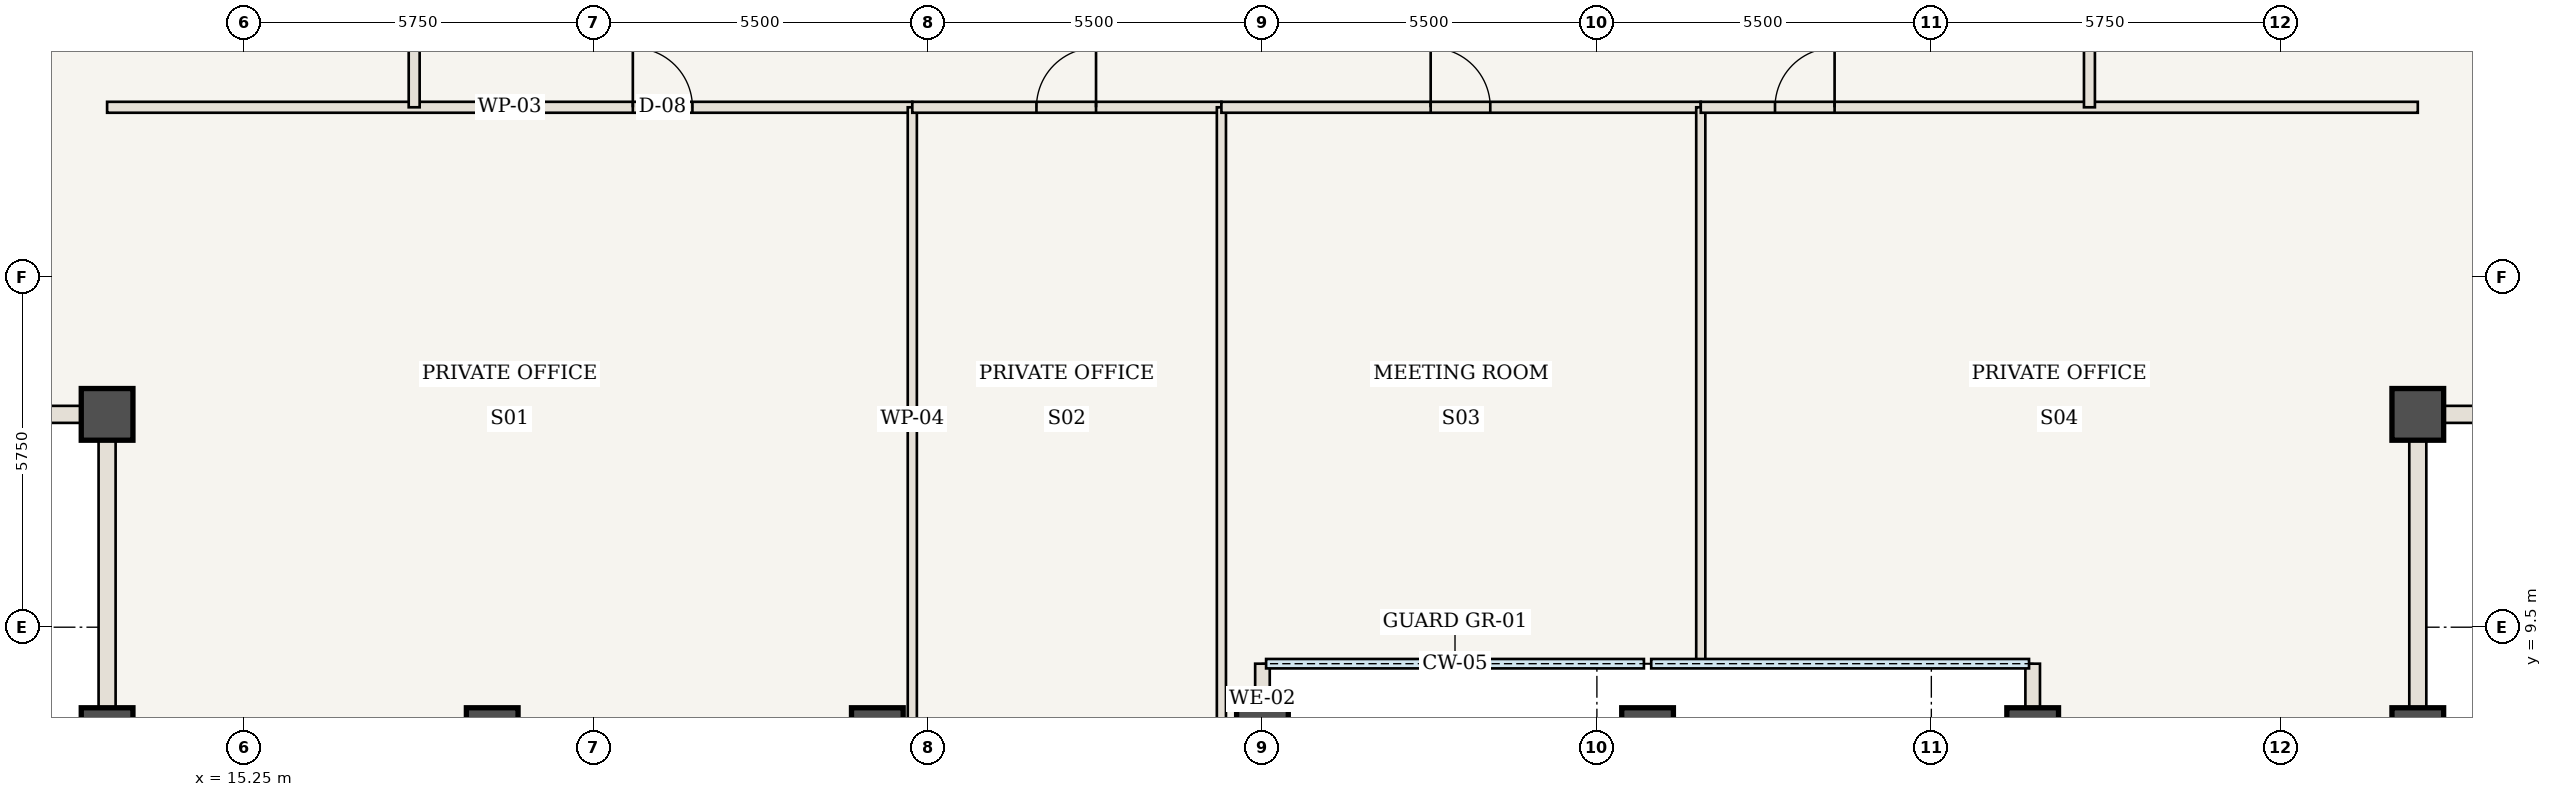
"""IFC4 building model, lengths in metres.
Left out: names, types, materials, properties, quantities, classifications, styles, units other than length and angle.
Written with IfcOpenShell. Run it as: python <this file> out.ifc"""

import sys

from ifc_helpers import new_model, si_unit, direction, frame, frame_2d, origin, origin_2d, place, context, subcontext, project, spatial, rectangle, extrude, element, fill, save


model = new_model("IFC4")
c1 = context("Model", 3, precision=1e-05, world=origin(), true_north=direction((0.0, 1.0)))
c2 = subcontext(c1, "Body", "Model", "MODEL_VIEW")
j1 = project(units=[si_unit("LENGTHUNIT", "METRE"), si_unit("PLANEANGLEUNIT", "RADIAN")], contexts=[c1])
p1 = place(None, origin())
s1 = spatial("IfcSite", under=j1, at=p1, CompositionType="ELEMENT")
p2 = place(p1, origin())
s2 = spatial("IfcBuilding", under=s1, at=p2, CompositionType="ELEMENT")
p3 = place(p2, frame((0.0, 0.0, 206.15)))
s3 = spatial("IfcBuildingStorey", under=s2, at=p3, CompositionType="ELEMENT", Elevation=206.15)
for number, where, z_axis, x_axis in (
    (1, (13.0, 7.75, 0.0), (0.0, 0.0, 1.0), (1.0, 0.0, 0.0)),
    (2, (13.0, 13.0, 0.0), (0.0, 0.0, 1.0), (1.0, 0.0, 0.0)),
    (3, (51.0, 7.75, 0.0), (0.0, 0.0, 1.0), (1.0, 0.0, 0.0)),
    (4, (51.0, 13.0, 0.0), (0.0, 0.0, 1.0), (1.0, 0.0, 0.0)),
    (5, (19.333, 7.75, 0.0), (0.0, 0.0, 1.0), (1.0, 0.0, 0.0)),
    (6, (25.667, 7.75, 0.0), (0.0, 0.0, 1.0), (1.0, 0.0, 0.0)),
    (7, (32.0, 7.75, 0.0), (0.0, 0.0, 1.0), (1.0, 0.0, 0.0)),
    (8, (38.333, 7.75, 0.0), (0.0, 0.0, 1.0), (1.0, 0.0, 0.0)),
    (9, (44.667, 7.75, 0.0), (0.0, 0.0, 1.0), (1.0, 0.0, 0.0)),
):
    element("IfcColumn", number, at=place(p3, frame(where, z_axis=z_axis, x_axis=x_axis)), inside=s3, PredefinedType="COLUMN", context=c2, shape_type="SweptSolid", body=[
        extrude(rectangle(XDim=0.85, YDim=0.85, at=origin_2d()), origin(), (0.0, 0.0, 1.0), 3.85),
    ])
p4 = place(p3, frame((13.0, 18.05, 0.0), z_axis=(0.0, 0.0, 1.0), x_axis=(1.0, 0.0, 0.0)))
e10 = element("IfcWall", 10, at=p4, inside=s3, PredefinedType="STANDARD", context=c2, shape_type="SweptSolid", body=[
    extrude(rectangle(XDim=13.242, YDim=0.18, at=frame_2d((6.621, 0.0))), origin(), (0.0, 0.0, 1.0), 3.685),
])
p5 = place(p4, frame((8.646, 0.0, 0.0)))
e11 = element("IfcOpeningElement", 11, at=p5, cuts=e10, PredefinedType="OPENING", context=c2, shape_type="SweptSolid", body=[
    extrude(rectangle(XDim=0.98, YDim=2.2, at=frame_2d((0.49, 1.1))), frame((0.0, 0.1, 0.0), z_axis=(0.0, -1.0, 0.0), x_axis=(1.0, 0.0, 0.0)), (0.0, 0.0, 1.0), 0.2),
])
p6 = place(p3, frame((26.242, 7.81, 0.0), z_axis=(0.0, 0.0, 1.0), x_axis=(0.0, 1.0, 0.0)))
e12 = element("IfcWall", 12, at=p6, inside=s3, PredefinedType="STANDARD", context=c2, shape_type="SweptSolid", body=[
    extrude(rectangle(XDim=10.24, YDim=0.15, at=frame_2d((5.12, 0.0))), origin(), (0.0, 0.0, 1.0), 3.685),
])
p7 = place(p3, frame((26.242, 18.05, 0.0), z_axis=(0.0, 0.0, 1.0), x_axis=(1.0, 0.0, 0.0)))
e13 = element("IfcWall", 13, at=p7, inside=s3, PredefinedType="STANDARD", context=c2, shape_type="SweptSolid", body=[
    extrude(rectangle(XDim=5.083, YDim=0.18, at=frame_2d((2.542, 0.0))), origin(), (0.0, 0.0, 1.0), 3.685),
])
p8 = place(p7, frame((2.042, 0.0, 0.0)))
e14 = element("IfcOpeningElement", 14, at=p8, cuts=e13, PredefinedType="OPENING", context=c2, shape_type="SweptSolid", body=[
    extrude(rectangle(XDim=0.98, YDim=2.2, at=frame_2d((0.49, 1.1))), frame((0.0, 0.1, 0.0), z_axis=(0.0, -1.0, 0.0), x_axis=(1.0, 0.0, 0.0)), (0.0, 0.0, 1.0), 0.2),
])
p9 = place(p3, frame((31.325, 7.81, 0.0), z_axis=(0.0, 0.0, 1.0), x_axis=(0.0, 1.0, 0.0)))
e15 = element("IfcWall", 15, at=p9, inside=s3, PredefinedType="STANDARD", context=c2, shape_type="SweptSolid", body=[
    extrude(rectangle(XDim=10.24, YDim=0.15, at=frame_2d((5.12, 0.0))), origin(), (0.0, 0.0, 1.0), 3.685),
])
p10 = place(p3, frame((31.325, 18.05, 0.0), z_axis=(0.0, 0.0, 1.0), x_axis=(1.0, 0.0, 0.0)))
e16 = element("IfcWall", 16, at=p10, inside=s3, PredefinedType="STANDARD", context=c2, shape_type="SweptSolid", body=[
    extrude(rectangle(XDim=7.883, YDim=0.18, at=frame_2d((3.942, 0.0))), origin(), (0.0, 0.0, 1.0), 3.685),
])
p11 = place(p10, frame((3.442, 0.0, 0.0)))
e17 = element("IfcOpeningElement", 17, at=p11, cuts=e16, PredefinedType="OPENING", context=c2, shape_type="SweptSolid", body=[
    extrude(rectangle(XDim=0.98, YDim=2.2, at=frame_2d((0.49, 1.1))), frame((0.0, 0.1, 0.0), z_axis=(0.0, -1.0, 0.0), x_axis=(1.0, 0.0, 0.0)), (0.0, 0.0, 1.0), 0.2),
])
p12 = place(p3, frame((39.208, 8.91, 0.0), z_axis=(0.0, 0.0, 1.0), x_axis=(0.0, 1.0, 0.0)))
e18 = element("IfcWall", 18, at=p12, inside=s3, PredefinedType="STANDARD", context=c2, shape_type="SweptSolid", body=[
    extrude(rectangle(XDim=9.14, YDim=0.15, at=frame_2d((4.57, 0.0))), origin(), (0.0, 0.0, 1.0), 3.685),
])
p13 = place(p3, frame((39.208, 18.05, 0.0), z_axis=(0.0, 0.0, 1.0), x_axis=(1.0, 0.0, 0.0)))
e19 = element("IfcWall", 19, at=p13, inside=s3, PredefinedType="STANDARD", context=c2, shape_type="SweptSolid", body=[
    extrude(rectangle(XDim=11.792, YDim=0.18, at=frame_2d((5.896, 0.0))), origin(), (0.0, 0.0, 1.0), 3.685),
])
p14 = place(p13, frame((1.221, 0.0, 0.0)))
e20 = element("IfcOpeningElement", 20, at=p14, cuts=e19, PredefinedType="OPENING", context=c2, shape_type="SweptSolid", body=[
    extrude(rectangle(XDim=0.98, YDim=2.2, at=frame_2d((0.49, 1.1))), frame((0.0, 0.1, 0.0), z_axis=(0.0, -1.0, 0.0), x_axis=(1.0, 0.0, 0.0)), (0.0, 0.0, 1.0), 0.2),
])
p15 = place(p3, frame((18.05, 18.05, 0.0), z_axis=(0.0, 0.0, 1.0), x_axis=(0.0, 1.0, 0.0)))
e21 = element("IfcWall", 21, at=p15, inside=s3, PredefinedType="STANDARD", context=c2, shape_type="SweptSolid", body=[
    extrude(rectangle(XDim=12.825, YDim=0.18, at=frame_2d((6.413, 0.0))), origin(), (0.0, 0.0, 1.0), 3.685),
])
p16 = place(p15, frame((5.913, 0.0, 0.0)))
e22 = element("IfcOpeningElement", 22, at=p16, cuts=e21, PredefinedType="OPENING", context=c2, shape_type="SweptSolid", body=[
    extrude(rectangle(XDim=0.98, YDim=2.2, at=frame_2d((0.49, 1.1))), frame((0.0, 0.1, 0.0), z_axis=(0.0, -1.0, 0.0), x_axis=(1.0, 0.0, 0.0)), (0.0, 0.0, 1.0), 0.2),
])
p17 = place(p3, frame((45.6, 18.05, 0.0), z_axis=(0.0, 0.0, 1.0), x_axis=(0.0, 1.0, 0.0)))
e23 = element("IfcWall", 23, at=p17, inside=s3, PredefinedType="STANDARD", context=c2, shape_type="SweptSolid", body=[
    extrude(rectangle(XDim=12.7, YDim=0.18, at=frame_2d((6.35, 0.0))), origin(), (0.0, 0.0, 1.0), 3.685),
])
p18 = place(p17, frame((5.85, 0.0, 0.0)))
e24 = element("IfcOpeningElement", 24, at=p18, cuts=e23, PredefinedType="OPENING", context=c2, shape_type="SweptSolid", body=[
    extrude(rectangle(XDim=0.98, YDim=2.2, at=frame_2d((0.49, 1.1))), frame((0.0, 0.1, 0.0), z_axis=(0.0, -1.0, 0.0), x_axis=(1.0, 0.0, 0.0)), (0.0, 0.0, 1.0), 0.2),
])
for number, where, z_axis, x_axis in (
    (25, (32.0, 7.75, 0.0), (0.0, 0.0, 1.0), (0.0, 1.0, 0.0)),
    (26, (44.667, 7.75, 0.0), (0.0, 0.0, 1.0), (0.0, 1.0, 0.0)),
):
    element("IfcWall", number, at=place(p3, frame(where, z_axis=z_axis, x_axis=x_axis)), inside=s3, PredefinedType="USERDEFINED", context=c2, shape_type="SweptSolid", body=[
        extrude(rectangle(XDim=1.15, YDim=0.24, at=frame_2d((0.575, 0.0))), origin(), (0.0, 0.0, 1.0), 2.985),
    ])
for number, where, z_axis, x_axis in (
    (27, (13.0, 7.75, 0.0), (0.0, 0.0, 1.0), (0.0, 1.0, 0.0)),
    (28, (13.0, 13.0, 0.0), (0.0, 0.0, 1.0), (-1.0, 0.0, 0.0)),
    (29, (51.0, 13.0, 0.0), (0.0, 0.0, 1.0), (0.0, -1.0, 0.0)),
    (30, (56.25, 13.0, 0.0), (0.0, 0.0, 1.0), (-1.0, 0.0, 0.0)),
):
    element("IfcWall", number, at=place(p3, frame(where, z_axis=z_axis, x_axis=x_axis)), inside=s3, PredefinedType="USERDEFINED", context=c2, shape_type="SweptSolid", body=[
        extrude(rectangle(XDim=5.25, YDim=0.28, at=frame_2d((2.625, 0.0))), origin(), (0.0, 0.0, 1.0), 2.985),
    ])
p19 = place(p5, origin())
e31 = element("IfcDoor", 31, at=p19, inside=s3, OperationType="SINGLE_SWING_LEFT", PredefinedType="DOOR", context=c2, shape_type="SweptSolid", body=[
    extrude(rectangle(XDim=0.98, YDim=2.2, at=frame_2d((0.49, 1.1))), frame((0.0, 0.025, 0.0), z_axis=(0.0, -1.0, 0.0), x_axis=(1.0, 0.0, 0.0)), (0.0, 0.0, 1.0), 0.05),
])
fill(e11, e31)
p20 = place(p8, origin())
e32 = element("IfcDoor", 32, at=p20, inside=s3, OperationType="SINGLE_SWING_RIGHT", PredefinedType="DOOR", context=c2, shape_type="SweptSolid", body=[
    extrude(rectangle(XDim=0.98, YDim=2.2, at=frame_2d((0.49, 1.1))), frame((0.0, 0.025, 0.0), z_axis=(0.0, -1.0, 0.0), x_axis=(1.0, 0.0, 0.0)), (0.0, 0.0, 1.0), 0.05),
])
fill(e14, e32)
p21 = place(p11, origin())
e33 = element("IfcDoor", 33, at=p21, inside=s3, OperationType="SINGLE_SWING_LEFT", PredefinedType="DOOR", context=c2, shape_type="SweptSolid", body=[
    extrude(rectangle(XDim=0.98, YDim=2.2, at=frame_2d((0.49, 1.1))), frame((0.0, 0.025, 0.0), z_axis=(0.0, -1.0, 0.0), x_axis=(1.0, 0.0, 0.0)), (0.0, 0.0, 1.0), 0.05),
])
fill(e17, e33)
p22 = place(p14, origin())
e34 = element("IfcDoor", 34, at=p22, inside=s3, OperationType="SINGLE_SWING_RIGHT", PredefinedType="DOOR", context=c2, shape_type="SweptSolid", body=[
    extrude(rectangle(XDim=0.98, YDim=2.2, at=frame_2d((0.49, 1.1))), frame((0.0, 0.025, 0.0), z_axis=(0.0, -1.0, 0.0), x_axis=(1.0, 0.0, 0.0)), (0.0, 0.0, 1.0), 0.05),
])
fill(e20, e34)
save(model, sys.argv[1])
